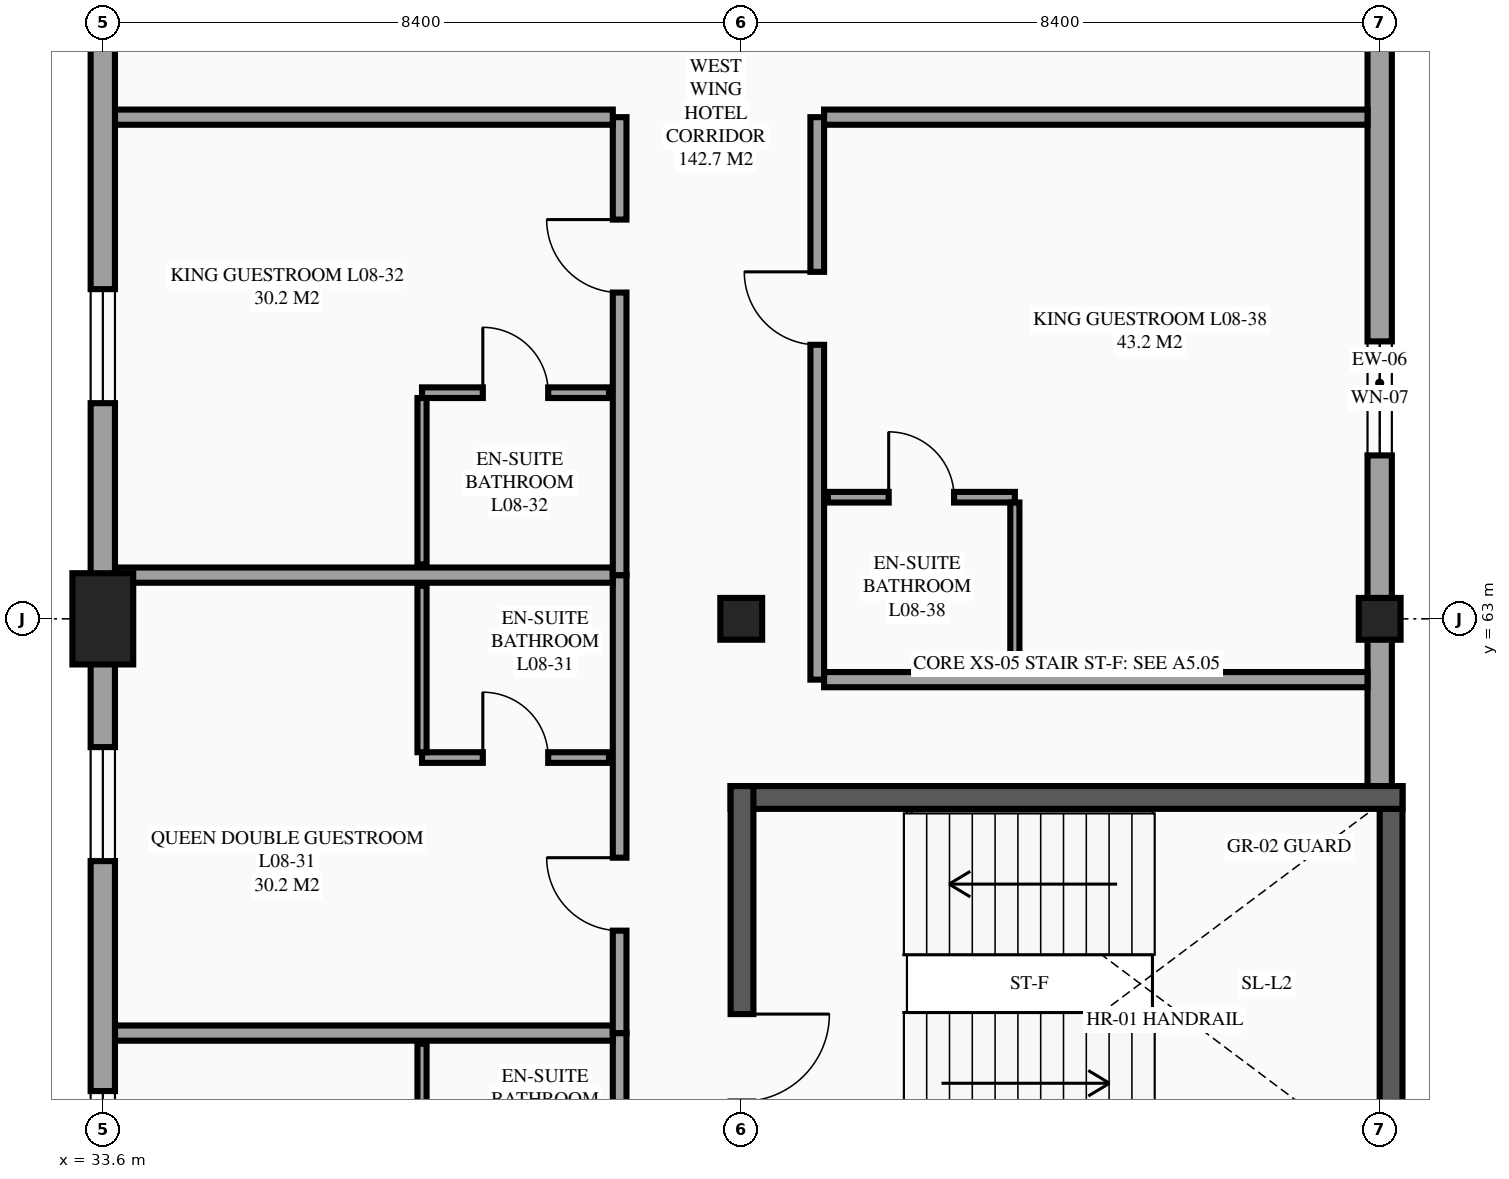
"""IFC4 building model, lengths in metres.
Left out: names, types, materials, properties, quantities, classifications, styles, units other than length and angle.
Written with IfcOpenShell. Run it as: python <this file> out.ifc"""

import sys

from ifc_helpers import new_model, si_unit, direction, frame, frame_2d, origin, origin_2d, place, context, subcontext, project, spatial, rectangle, extrude, element, fill, save


model = new_model("IFC4")
c1 = context("Model", 3, precision=1e-05, world=origin(), true_north=direction((0.0, 1.0)))
c2 = subcontext(c1, "Body", "Model", "MODEL_VIEW")
j1 = project(units=[si_unit("LENGTHUNIT", "METRE"), si_unit("PLANEANGLEUNIT", "RADIAN")], contexts=[c1])
p1 = place(None, origin())
s1 = spatial("IfcSite", under=j1, at=p1, CompositionType="ELEMENT")
p2 = place(p1, origin())
s2 = spatial("IfcBuilding", under=s1, at=p2, CompositionType="ELEMENT")
p3 = place(p2, frame((0.0, 0.0, 32.7)))
s3 = spatial("IfcBuildingStorey", under=s2, at=p3, CompositionType="ELEMENT", Elevation=32.7)
p4 = place(p3, frame((33.6, 63.0, 0.0), z_axis=(0.0, 0.0, 1.0), x_axis=(1.0, 0.0, 0.0)))
e1 = element("IfcColumn", 1, at=p4, inside=s3, PredefinedType="COLUMN", context=c2, shape_type="SweptSolid", body=[
    extrude(rectangle(XDim=0.8, YDim=1.2, at=origin_2d()), origin(), (0.0, 0.0, 1.0), 3.6),
])
for number, where, z_axis, x_axis in (
    (2, (42.0, 63.0, 0.0), (0.0, 0.0, 1.0), (1.0, 0.0, 0.0)),
    (3, (50.4, 63.0, 0.0), (0.0, 0.0, 1.0), (1.0, 0.0, 0.0)),
):
    element("IfcColumn", number, at=place(p3, frame(where, z_axis=z_axis, x_axis=x_axis)), inside=s3, PredefinedType="COLUMN", context=c2, shape_type="SweptSolid", body=[
        extrude(rectangle(XDim=0.55, YDim=0.55, at=origin_2d()), origin(), (0.0, 0.0, 1.0), 3.6),
    ])
p5 = place(p3, frame((50.4, 60.8, 0.0), z_axis=(0.0, 0.0, 1.0), x_axis=(0.0, 1.0, 0.0)))
e4 = element("IfcWall", 4, at=p5, inside=s3, PredefinedType="STANDARD", context=c2, shape_type="SweptSolid", body=[
    extrude(rectangle(XDim=10.6, YDim=0.32, at=frame_2d((5.3, 0.0))), origin(), (0.0, 0.0, 1.0), 2.63),
])
p6 = place(p5, frame((4.35, 0.0, 0.85)))
e5 = element("IfcOpeningElement", 5, at=p6, cuts=e4, PredefinedType="OPENING", context=c2, shape_type="SweptSolid", body=[
    extrude(rectangle(XDim=1.5, YDim=1.5, at=frame_2d((0.75, 0.75))), frame((0.0, 0.17, 0.0), z_axis=(0.0, -1.0, 0.0), x_axis=(1.0, 0.0, 0.0)), (0.0, 0.0, 1.0), 0.34),
])
p7 = place(p3, frame((50.55, 55.6, 0.0), z_axis=(0.0, 0.0, 1.0), x_axis=(0.0, 1.0, 0.0)))
e6 = element("IfcWall", 6, at=p7, inside=s3, PredefinedType="SHEAR", context=c2, shape_type="SweptSolid", body=[
    extrude(rectangle(XDim=5.2, YDim=0.3, at=frame_2d((2.6, 0.0))), origin(), (0.0, 0.0, 1.0), 3.6),
])
p8 = place(p3, frame((50.7, 60.65, 0.0), z_axis=(0.0, 0.0, 1.0), x_axis=(-1.0, 0.0, 0.0)))
e7 = element("IfcWall", 7, at=p8, inside=s3, PredefinedType="SHEAR", context=c2, shape_type="SweptSolid", body=[
    extrude(rectangle(XDim=8.84, YDim=0.3, at=frame_2d((4.42, 0.0))), origin(), (0.0, 0.0, 1.0), 3.6),
])
p9 = place(p3, frame((42.01, 60.8, 0.0), z_axis=(0.0, 0.0, 1.0), x_axis=(0.0, -1.0, 0.0)))
e8 = element("IfcWall", 8, at=p9, inside=s3, PredefinedType="SHEAR", context=c2, shape_type="SweptSolid", body=[
    extrude(rectangle(XDim=5.2, YDim=0.3, at=frame_2d((2.6, 0.0))), origin(), (0.0, 0.0, 1.0), 3.6),
])
p10 = place(p9, frame((3.0, 0.0, 0.0)))
e9 = element("IfcOpeningElement", 9, at=p10, cuts=e8, PredefinedType="OPENING", context=c2, shape_type="SweptSolid", body=[
    extrude(rectangle(XDim=1.15, YDim=2.15, at=frame_2d((0.575, 1.075))), frame((0.0, 0.16, 0.0), z_axis=(0.0, -1.0, 0.0), x_axis=(1.0, 0.0, 0.0)), (0.0, 0.0, 1.0), 0.32),
])
p11 = place(p3, frame((40.4, 51.525, 0.0), z_axis=(0.0, 0.0, 1.0), x_axis=(0.0, 1.0, 0.0)))
e10 = element("IfcWall", 10, at=p11, inside=s3, PredefinedType="PARTITIONING", context=c2, shape_type="SweptSolid", body=[
    extrude(rectangle(XDim=6.025, YDim=0.18, at=frame_2d((3.013, 0.0))), origin(), (0.0, 0.0, 1.0), 3.375),
])
p12 = place(p11, frame((0.647, 0.0, 0.0)))
e11 = element("IfcOpeningElement", 11, at=p12, cuts=e10, PredefinedType="OPENING", context=c2, shape_type="SweptSolid", body=[
    extrude(rectangle(XDim=0.96, YDim=2.15, at=frame_2d((0.48, 1.075))), frame((0.0, 0.1, 0.0), z_axis=(0.0, -1.0, 0.0), x_axis=(1.0, 0.0, 0.0)), (0.0, 0.0, 1.0), 0.2),
])
p13 = place(p3, frame((33.76, 57.55, 0.0), z_axis=(0.0, 0.0, 1.0), x_axis=(1.0, 0.0, 0.0)))
e12 = element("IfcWall", 12, at=p13, inside=s3, PredefinedType="PARTITIONING", context=c2, shape_type="SweptSolid", body=[
    extrude(rectangle(XDim=6.55, YDim=0.2, at=frame_2d((3.275, 0.0))), origin(), (0.0, 0.0, 1.0), 3.375),
])
p14 = place(p3, frame((37.8, 55.22, 0.0), z_axis=(0.0, 0.0, 1.0), x_axis=(0.0, 1.0, 0.0)))
e13 = element("IfcWall", 13, at=p14, inside=s3, PredefinedType="PARTITIONING", context=c2, shape_type="SweptSolid", body=[
    extrude(rectangle(XDim=2.19, YDim=0.12, at=frame_2d((1.095, 0.0))), origin(), (0.0, 0.0, 1.0), 3.375),
])
p15 = place(p3, frame((40.4, 57.55, 0.0), z_axis=(0.0, 0.0, 1.0), x_axis=(0.0, 1.0, 0.0)))
e14 = element("IfcWall", 14, at=p15, inside=s3, PredefinedType="PARTITIONING", context=c2, shape_type="SweptSolid", body=[
    extrude(rectangle(XDim=6.025, YDim=0.18, at=frame_2d((3.012, 0.0))), origin(), (0.0, 0.0, 1.0), 3.375),
])
p16 = place(p15, frame((1.347, 0.0, 0.0)))
e15 = element("IfcOpeningElement", 15, at=p16, cuts=e14, PredefinedType="OPENING", context=c2, shape_type="SweptSolid", body=[
    extrude(rectangle(XDim=0.96, YDim=2.15, at=frame_2d((0.48, 1.075))), frame((0.0, 0.1, 0.0), z_axis=(0.0, -1.0, 0.0), x_axis=(1.0, 0.0, 0.0)), (0.0, 0.0, 1.0), 0.2),
])
p17 = place(p3, frame((33.76, 63.575, 0.0), z_axis=(0.0, 0.0, 1.0), x_axis=(1.0, 0.0, 0.0)))
e16 = element("IfcWall", 16, at=p17, inside=s3, PredefinedType="PARTITIONING", context=c2, shape_type="SweptSolid", body=[
    extrude(rectangle(XDim=6.55, YDim=0.2, at=frame_2d((3.275, 0.0))), origin(), (0.0, 0.0, 1.0), 3.375),
])
p18 = place(p3, frame((37.8, 61.175, 0.0), z_axis=(0.0, 0.0, 1.0), x_axis=(1.0, 0.0, 0.0)))
e17 = element("IfcWall", 17, at=p18, inside=s3, PredefinedType="PARTITIONING", context=c2, shape_type="SweptSolid", body=[
    extrude(rectangle(XDim=2.46, YDim=0.14, at=frame_2d((1.23, 0.0))), origin(), (0.0, 0.0, 1.0), 3.375),
])
p19 = place(p18, frame((0.8, 0.0, 0.0)))
e18 = element("IfcOpeningElement", 18, at=p19, cuts=e17, PredefinedType="OPENING", context=c2, shape_type="SweptSolid", body=[
    extrude(rectangle(XDim=0.86, YDim=2.1, at=frame_2d((0.43, 1.05))), frame((0.0, 0.08, 0.0), z_axis=(0.0, -1.0, 0.0), x_axis=(1.0, 0.0, 0.0)), (0.0, 0.0, 1.0), 0.16),
])
p20 = place(p3, frame((37.8, 61.245, 0.0), z_axis=(0.0, 0.0, 1.0), x_axis=(0.0, 1.0, 0.0)))
e19 = element("IfcWall", 19, at=p20, inside=s3, PredefinedType="PARTITIONING", context=c2, shape_type="SweptSolid", body=[
    extrude(rectangle(XDim=2.19, YDim=0.12, at=frame_2d((1.095, 0.0))), origin(), (0.0, 0.0, 1.0), 3.375),
])
p21 = place(p3, frame((40.4, 63.575, 0.0), z_axis=(0.0, 0.0, 1.0), x_axis=(0.0, 1.0, 0.0)))
e20 = element("IfcWall", 20, at=p21, inside=s3, PredefinedType="PARTITIONING", context=c2, shape_type="SweptSolid", body=[
    extrude(rectangle(XDim=6.025, YDim=0.18, at=frame_2d((3.013, 0.0))), origin(), (0.0, 0.0, 1.0), 3.375),
])
p22 = place(p21, frame((3.718, 0.0, 0.0)))
e21 = element("IfcOpeningElement", 21, at=p22, cuts=e20, PredefinedType="OPENING", context=c2, shape_type="SweptSolid", body=[
    extrude(rectangle(XDim=0.96, YDim=2.15, at=frame_2d((0.48, 1.075))), frame((0.0, 0.1, 0.0), z_axis=(0.0, -1.0, 0.0), x_axis=(1.0, 0.0, 0.0)), (0.0, 0.0, 1.0), 0.2),
])
p23 = place(p3, frame((33.76, 69.6, 0.0), z_axis=(0.0, 0.0, 1.0), x_axis=(1.0, 0.0, 0.0)))
e22 = element("IfcWall", 22, at=p23, inside=s3, PredefinedType="PARTITIONING", context=c2, shape_type="SweptSolid", body=[
    extrude(rectangle(XDim=6.55, YDim=0.2, at=frame_2d((3.275, 0.0))), origin(), (0.0, 0.0, 1.0), 3.375),
])
p24 = place(p3, frame((37.8, 65.975, 0.0), z_axis=(0.0, 0.0, 1.0), x_axis=(1.0, 0.0, 0.0)))
e23 = element("IfcWall", 23, at=p24, inside=s3, PredefinedType="PARTITIONING", context=c2, shape_type="SweptSolid", body=[
    extrude(rectangle(XDim=2.46, YDim=0.14, at=frame_2d((1.23, 0.0))), origin(), (0.0, 0.0, 1.0), 3.375),
])
p25 = place(p24, frame((0.8, 0.0, 0.0)))
e24 = element("IfcOpeningElement", 24, at=p25, cuts=e23, PredefinedType="OPENING", context=c2, shape_type="SweptSolid", body=[
    extrude(rectangle(XDim=0.86, YDim=2.1, at=frame_2d((0.43, 1.05))), frame((0.0, 0.08, 0.0), z_axis=(0.0, -1.0, 0.0), x_axis=(1.0, 0.0, 0.0)), (0.0, 0.0, 1.0), 0.16),
])
p26 = place(p3, frame((37.8, 63.715, 0.0), z_axis=(0.0, 0.0, 1.0), x_axis=(0.0, 1.0, 0.0)))
e25 = element("IfcWall", 25, at=p26, inside=s3, PredefinedType="PARTITIONING", context=c2, shape_type="SweptSolid", body=[
    extrude(rectangle(XDim=2.19, YDim=0.12, at=frame_2d((1.095, 0.0))), origin(), (0.0, 0.0, 1.0), 3.375),
])
p27 = place(p3, frame((43.0, 62.2, 0.0), z_axis=(0.0, 0.0, 1.0), x_axis=(0.0, 1.0, 0.0)))
e26 = element("IfcWall", 26, at=p27, inside=s3, PredefinedType="PARTITIONING", context=c2, shape_type="SweptSolid", body=[
    extrude(rectangle(XDim=7.4, YDim=0.18, at=frame_2d((3.7, 0.0))), origin(), (0.0, 0.0, 1.0), 3.375),
])
p28 = place(p27, frame((4.405, 0.0, 0.0)))
e27 = element("IfcOpeningElement", 27, at=p28, cuts=e26, PredefinedType="OPENING", context=c2, shape_type="SweptSolid", body=[
    extrude(rectangle(XDim=0.96, YDim=2.15, at=frame_2d((0.48, 1.075))), frame((0.0, 0.1, 0.0), z_axis=(0.0, -1.0, 0.0), x_axis=(1.0, 0.0, 0.0)), (0.0, 0.0, 1.0), 0.2),
])
for number, where, z_axis, x_axis in (
    (28, (43.09, 62.2, 0.0), (0.0, 0.0, 1.0), (1.0, 0.0, 0.0)),
    (29, (43.09, 69.6, 0.0), (0.0, 0.0, 1.0), (1.0, 0.0, 0.0)),
):
    element("IfcWall", number, at=place(p3, frame(where, z_axis=z_axis, x_axis=x_axis)), inside=s3, PredefinedType="PARTITIONING", context=c2, shape_type="SweptSolid", body=[
        extrude(rectangle(XDim=7.15, YDim=0.2, at=frame_2d((3.575, 0.0))), origin(), (0.0, 0.0, 1.0), 3.375),
    ])
p29 = place(p3, frame((43.14, 64.6, 0.0), z_axis=(0.0, 0.0, 1.0), x_axis=(1.0, 0.0, 0.0)))
e30 = element("IfcWall", 30, at=p29, inside=s3, PredefinedType="PARTITIONING", context=c2, shape_type="SweptSolid", body=[
    extrude(rectangle(XDim=2.46, YDim=0.14, at=frame_2d((1.23, 0.0))), origin(), (0.0, 0.0, 1.0), 3.375),
])
p30 = place(p29, frame((0.8, 0.0, 0.0)))
e31 = element("IfcOpeningElement", 31, at=p30, cuts=e30, PredefinedType="OPENING", context=c2, shape_type="SweptSolid", body=[
    extrude(rectangle(XDim=0.86, YDim=2.1, at=frame_2d((0.43, 1.05))), frame((0.0, 0.08, 0.0), z_axis=(0.0, -1.0, 0.0), x_axis=(1.0, 0.0, 0.0)), (0.0, 0.0, 1.0), 0.16),
])
p31 = place(p3, frame((45.6, 62.34, 0.0), z_axis=(0.0, 0.0, 1.0), x_axis=(0.0, 1.0, 0.0)))
e32 = element("IfcWall", 32, at=p31, inside=s3, PredefinedType="PARTITIONING", context=c2, shape_type="SweptSolid", body=[
    extrude(rectangle(XDim=2.19, YDim=0.12, at=frame_2d((1.095, 0.0))), origin(), (0.0, 0.0, 1.0), 3.375),
])
p32 = place(p3, frame((33.6, 71.4, 0.0), z_axis=(0.0, 0.0, 1.0), x_axis=(0.0, -1.0, 0.0)))
e33 = element("IfcWall", 33, at=p32, inside=s3, PredefinedType="STANDARD", context=c2, shape_type="SweptSolid", body=[
    extrude(rectangle(XDim=8.4, YDim=0.32, at=frame_2d((4.2, 0.0))), origin(), (0.0, 0.0, 1.0), 2.43),
])
p33 = place(p32, frame((4.062, 0.0, 0.85)))
e34 = element("IfcOpeningElement", 34, at=p33, cuts=e33, PredefinedType="OPENING", context=c2, shape_type="SweptSolid", body=[
    extrude(rectangle(XDim=1.5, YDim=1.5, at=frame_2d((0.75, 0.75))), frame((0.0, 0.17, 0.0), z_axis=(0.0, -1.0, 0.0), x_axis=(1.0, 0.0, 0.0)), (0.0, 0.0, 1.0), 0.34),
])
p34 = place(p3, frame((33.6, 63.0, 0.0), z_axis=(0.0, 0.0, 1.0), x_axis=(0.0, -1.0, 0.0)))
e35 = element("IfcWall", 35, at=p34, inside=s3, PredefinedType="STANDARD", context=c2, shape_type="SweptSolid", body=[
    extrude(rectangle(XDim=8.4, YDim=0.32, at=frame_2d((4.2, 0.0))), origin(), (0.0, 0.0, 1.0), 2.78),
])
p35 = place(p34, frame((6.212, 0.0, 0.85)))
e36 = element("IfcOpeningElement", 36, at=p35, cuts=e35, PredefinedType="OPENING", context=c2, shape_type="SweptSolid", body=[
    extrude(rectangle(XDim=1.5, YDim=1.5, at=frame_2d((0.75, 0.75))), frame((0.0, 0.17, 0.0), z_axis=(0.0, -1.0, 0.0), x_axis=(1.0, 0.0, 0.0)), (0.0, 0.0, 1.0), 0.34),
])
p36 = place(p34, frame((1.688, 0.0, 0.85)))
e37 = element("IfcOpeningElement", 37, at=p36, cuts=e35, PredefinedType="OPENING", context=c2, shape_type="SweptSolid", body=[
    extrude(rectangle(XDim=1.5, YDim=1.5, at=frame_2d((0.75, 0.75))), frame((0.0, 0.17, 0.0), z_axis=(0.0, -1.0, 0.0), x_axis=(1.0, 0.0, 0.0)), (0.0, 0.0, 1.0), 0.34),
])
p37 = place(p35, origin())
e38 = element("IfcWindow", 38, at=p37, inside=s3, PartitioningType="SINGLE_PANEL", PredefinedType="WINDOW", context=c2, shape_type="SweptSolid", body=[
    extrude(rectangle(XDim=1.5, YDim=1.5, at=frame_2d((0.75, 0.75))), frame((0.0, 0.03, 0.0), z_axis=(0.0, -1.0, 0.0), x_axis=(1.0, 0.0, 0.0)), (0.0, 0.0, 1.0), 0.06),
])
fill(e36, e38)
p38 = place(p36, origin())
e39 = element("IfcWindow", 39, at=p38, inside=s3, PartitioningType="SINGLE_PANEL", PredefinedType="WINDOW", context=c2, shape_type="SweptSolid", body=[
    extrude(rectangle(XDim=1.5, YDim=1.5, at=frame_2d((0.75, 0.75))), frame((0.0, 0.03, 0.0), z_axis=(0.0, -1.0, 0.0), x_axis=(1.0, 0.0, 0.0)), (0.0, 0.0, 1.0), 0.06),
])
fill(e37, e39)
p39 = place(p33, origin())
e40 = element("IfcWindow", 40, at=p39, inside=s3, PartitioningType="SINGLE_PANEL", PredefinedType="WINDOW", context=c2, shape_type="SweptSolid", body=[
    extrude(rectangle(XDim=1.5, YDim=1.5, at=frame_2d((0.75, 0.75))), frame((0.0, 0.03, 0.0), z_axis=(0.0, -1.0, 0.0), x_axis=(1.0, 0.0, 0.0)), (0.0, 0.0, 1.0), 0.06),
])
fill(e34, e40)
p40 = place(p6, origin())
e41 = element("IfcWindow", 41, at=p40, inside=s3, PartitioningType="SINGLE_PANEL", PredefinedType="WINDOW", context=c2, shape_type="SweptSolid", body=[
    extrude(rectangle(XDim=1.5, YDim=1.5, at=frame_2d((0.75, 0.75))), frame((0.0, 0.03, 0.0), z_axis=(0.0, -1.0, 0.0), x_axis=(1.0, 0.0, 0.0)), (0.0, 0.0, 1.0), 0.06),
])
fill(e5, e41)
p41 = place(p10, origin())
e42 = element("IfcDoor", 42, at=p41, inside=s3, OperationType="SINGLE_SWING_LEFT", PredefinedType="DOOR", context=c2, shape_type="SweptSolid", body=[
    extrude(rectangle(XDim=1.15, YDim=2.15, at=frame_2d((0.575, 1.075))), frame((0.0, 0.025, 0.0), z_axis=(0.0, -1.0, 0.0), x_axis=(1.0, 0.0, 0.0)), (0.0, 0.0, 1.0), 0.05),
])
fill(e9, e42)
p42 = place(p16, origin())
e43 = element("IfcDoor", 43, at=p42, inside=s3, OperationType="SINGLE_SWING_RIGHT", PredefinedType="DOOR", context=c2, shape_type="SweptSolid", body=[
    extrude(rectangle(XDim=0.96, YDim=2.15, at=frame_2d((0.48, 1.075))), frame((0.0, 0.025, 0.0), z_axis=(0.0, -1.0, 0.0), x_axis=(1.0, 0.0, 0.0)), (0.0, 0.0, 1.0), 0.05),
])
fill(e15, e43)
p43 = place(p19, origin())
e44 = element("IfcDoor", 44, at=p43, inside=s3, OperationType="SINGLE_SWING_LEFT", PredefinedType="DOOR", context=c2, shape_type="SweptSolid", body=[
    extrude(rectangle(XDim=0.86, YDim=2.1, at=frame_2d((0.43, 1.05))), frame((0.0, 0.025, 0.0), z_axis=(0.0, -1.0, 0.0), x_axis=(1.0, 0.0, 0.0)), (0.0, 0.0, 1.0), 0.05),
])
fill(e18, e44)
p44 = place(p22, origin())
e45 = element("IfcDoor", 45, at=p44, inside=s3, OperationType="SINGLE_SWING_RIGHT", PredefinedType="DOOR", context=c2, shape_type="SweptSolid", body=[
    extrude(rectangle(XDim=0.96, YDim=2.15, at=frame_2d((0.48, 1.075))), frame((0.0, 0.025, 0.0), z_axis=(0.0, -1.0, 0.0), x_axis=(1.0, 0.0, 0.0)), (0.0, 0.0, 1.0), 0.05),
])
fill(e21, e45)
p45 = place(p25, origin())
e46 = element("IfcDoor", 46, at=p45, inside=s3, OperationType="SINGLE_SWING_LEFT", PredefinedType="DOOR", context=c2, shape_type="SweptSolid", body=[
    extrude(rectangle(XDim=0.86, YDim=2.1, at=frame_2d((0.43, 1.05))), frame((0.0, 0.025, 0.0), z_axis=(0.0, -1.0, 0.0), x_axis=(1.0, 0.0, 0.0)), (0.0, 0.0, 1.0), 0.05),
])
fill(e24, e46)
p46 = place(p28, origin())
e47 = element("IfcDoor", 47, at=p46, inside=s3, OperationType="SINGLE_SWING_RIGHT", PredefinedType="DOOR", context=c2, shape_type="SweptSolid", body=[
    extrude(rectangle(XDim=0.96, YDim=2.15, at=frame_2d((0.48, 1.075))), frame((0.0, 0.025, 0.0), z_axis=(0.0, -1.0, 0.0), x_axis=(1.0, 0.0, 0.0)), (0.0, 0.0, 1.0), 0.05),
])
fill(e27, e47)
p47 = place(p30, origin())
e48 = element("IfcDoor", 48, at=p47, inside=s3, OperationType="SINGLE_SWING_LEFT", PredefinedType="DOOR", context=c2, shape_type="SweptSolid", body=[
    extrude(rectangle(XDim=0.86, YDim=2.1, at=frame_2d((0.43, 1.05))), frame((0.0, 0.025, 0.0), z_axis=(0.0, -1.0, 0.0), x_axis=(1.0, 0.0, 0.0)), (0.0, 0.0, 1.0), 0.05),
])
fill(e31, e48)
save(model, sys.argv[1])
